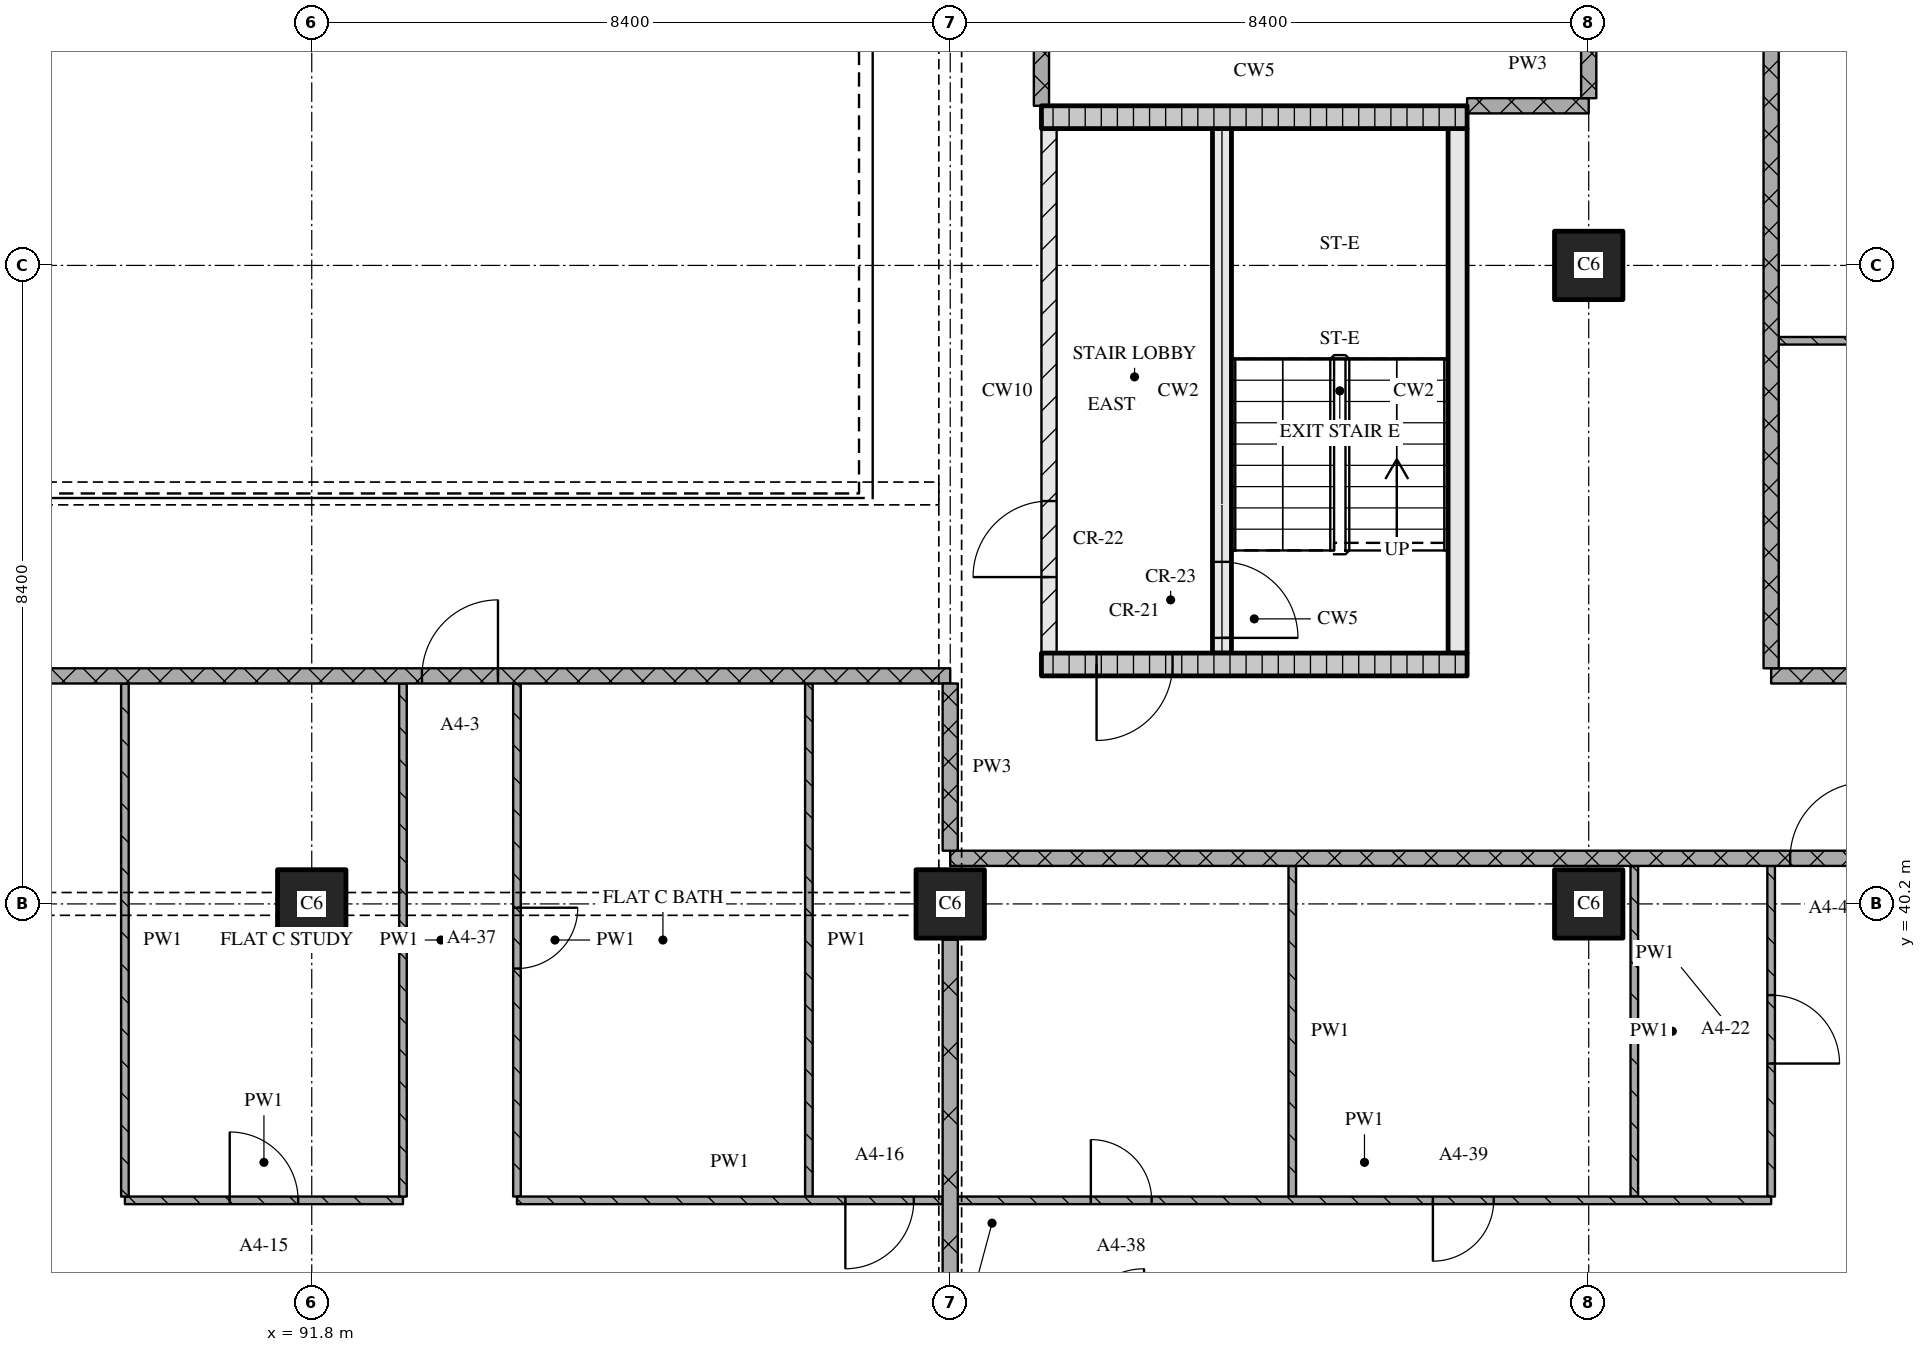
"""IFC4 building model, lengths in metres.
Left out: names, types, materials, properties, quantities, classifications, styles, units other than length and angle.
Written with IfcOpenShell. Run it as: python <this file> out.ifc"""

import sys

from ifc_helpers import new_model, si_unit, direction, frame, frame_2d, origin, origin_2d, place, context, subcontext, project, spatial, rectangle, extrude, element, fill, save


model = new_model("IFC4")
c1 = context("Model", 3, precision=1e-05, world=origin(), true_north=direction((0.0, 1.0)))
c2 = subcontext(c1, "Body", "Model", "MODEL_VIEW")
j1 = project(units=[si_unit("LENGTHUNIT", "METRE"), si_unit("PLANEANGLEUNIT", "RADIAN")], contexts=[c1])
p1 = place(None, origin())
s1 = spatial("IfcSite", under=j1, at=p1, CompositionType="ELEMENT")
p2 = place(p1, origin())
s2 = spatial("IfcBuilding", under=s1, at=p2, CompositionType="ELEMENT")
p3 = place(p2, frame((0.0, 0.0, 69.6)))
s3 = spatial("IfcBuildingStorey", under=s2, at=p3, CompositionType="ELEMENT", Elevation=69.6)
for number, where, z_axis, x_axis in (
    (1, (91.8, 40.2, 0.0), (0.0, 0.0, 1.0), (1.0, 0.0, 0.0)),
    (2, (100.2, 40.2, 0.0), (0.0, 0.0, 1.0), (1.0, 0.0, 0.0)),
    (3, (108.6, 40.2, 0.0), (0.0, 0.0, 1.0), (1.0, 0.0, 0.0)),
    (4, (108.6, 48.6, 0.0), (0.0, 0.0, 1.0), (1.0, 0.0, 0.0)),
):
    element("IfcColumn", number, at=place(p3, frame(where, z_axis=z_axis, x_axis=x_axis)), inside=s3, PredefinedType="COLUMN", context=c2, shape_type="SweptSolid", body=[
        extrude(rectangle(XDim=0.9, YDim=0.9, at=origin_2d()), origin(), (0.0, 0.0, 1.0), 3.6),
    ])
p4 = place(p3, frame((101.4, 43.35, 0.0), z_axis=(0.0, 0.0, 1.0), x_axis=(1.0, 0.0, 0.0)))
e5 = element("IfcWall", 5, at=p4, inside=s3, PredefinedType="SOLIDWALL", context=c2, shape_type="SweptSolid", body=[
    extrude(rectangle(XDim=5.6, YDim=0.3, at=frame_2d((2.8, 0.0))), origin(), (0.0, 0.0, 1.0), 3.32),
])
p5 = place(p4, frame((0.725, 0.0, 0.0)))
e6 = element("IfcOpeningElement", 6, at=p5, cuts=e5, PredefinedType="OPENING", context=c2, shape_type="SweptSolid", body=[
    extrude(rectangle(XDim=1.0, YDim=2.1, at=frame_2d((0.5, 1.05))), frame((0.0, 0.16, 0.0), z_axis=(0.0, -1.0, 0.0), x_axis=(1.0, 0.0, 0.0)), (0.0, 0.0, 1.0), 0.32),
])
p6 = place(p3, frame((101.5, 43.5, 0.0), z_axis=(0.0, 0.0, 1.0), x_axis=(0.0, 1.0, 0.0)))
e7 = element("IfcWall", 7, at=p6, inside=s3, PredefinedType="PARTITIONING", context=c2, shape_type="SweptSolid", body=[
    extrude(rectangle(XDim=6.9, YDim=0.2, at=frame_2d((3.45, 0.0))), origin(), (0.0, 0.0, 1.0), 3.32),
])
p7 = place(p6, frame((1.0, 0.0, 0.0)))
e8 = element("IfcOpeningElement", 8, at=p7, cuts=e7, PredefinedType="OPENING", context=c2, shape_type="SweptSolid", body=[
    extrude(rectangle(XDim=1.0, YDim=2.1, at=frame_2d((0.5, 1.05))), frame((0.0, 0.11, 0.0), z_axis=(0.0, -1.0, 0.0), x_axis=(1.0, 0.0, 0.0)), (0.0, 0.0, 1.0), 0.22),
])
p8 = place(p3, frame((103.775, 43.5, 0.0), z_axis=(0.0, 0.0, 1.0), x_axis=(0.0, 1.0, 0.0)))
e9 = element("IfcWall", 9, at=p8, inside=s3, PredefinedType="SOLIDWALL", context=c2, shape_type="SweptSolid", body=[
    extrude(rectangle(XDim=6.9, YDim=0.25, at=frame_2d((3.45, 0.0))), origin(), (0.0, 0.0, 1.0), 3.32),
])
p9 = place(p8, frame((0.2, 0.0, 0.0)))
e10 = element("IfcOpeningElement", 10, at=p9, cuts=e9, PredefinedType="OPENING", context=c2, shape_type="SweptSolid", body=[
    extrude(rectangle(XDim=1.0, YDim=2.1, at=frame_2d((0.5, 1.05))), frame((0.0, 0.135, 0.0), z_axis=(0.0, -1.0, 0.0), x_axis=(1.0, 0.0, 0.0)), (0.0, 0.0, 1.0), 0.27),
])
p10 = place(p3, frame((106.875, 43.5, 0.0), z_axis=(0.0, 0.0, 1.0), x_axis=(0.0, 1.0, 0.0)))
e11 = element("IfcWall", 11, at=p10, inside=s3, PredefinedType="SOLIDWALL", context=c2, shape_type="SweptSolid", body=[
    extrude(rectangle(XDim=6.9, YDim=0.25, at=frame_2d((3.45, 0.0))), origin(), (0.0, 0.0, 1.0), 3.32),
])
p11 = place(p3, frame((101.4, 50.55, 0.0), z_axis=(0.0, 0.0, 1.0), x_axis=(1.0, 0.0, 0.0)))
e12 = element("IfcWall", 12, at=p11, inside=s3, PredefinedType="SOLIDWALL", context=c2, shape_type="SweptSolid", body=[
    extrude(rectangle(XDim=5.6, YDim=0.3, at=frame_2d((2.8, 0.0))), origin(), (0.0, 0.0, 1.0), 3.32),
])
p12 = place(p3, frame((89.342, 36.3, 0.0), z_axis=(0.0, 0.0, 1.0), x_axis=(1.0, 0.0, 0.0)))
e13 = element("IfcWall", 13, at=p12, inside=s3, PredefinedType="PARTITIONING", context=c2, shape_type="SweptSolid", body=[
    extrude(rectangle(XDim=3.658, YDim=0.1, at=frame_2d((1.829, 0.0))), origin(), (0.0, 0.0, 1.0), 3.32),
])
p13 = place(p12, frame((1.379, 0.0, 0.0)))
e14 = element("IfcOpeningElement", 14, at=p13, cuts=e13, PredefinedType="OPENING", context=c2, shape_type="SweptSolid", body=[
    extrude(rectangle(XDim=0.9, YDim=2.1, at=frame_2d((0.45, 1.05))), frame((0.0, 0.06, 0.0), z_axis=(0.0, -1.0, 0.0), x_axis=(1.0, 0.0, 0.0)), (0.0, 0.0, 1.0), 0.12),
])
p14 = place(p3, frame((124.28, 40.8, 0.0), z_axis=(0.0, 0.0, 1.0), x_axis=(-1.0, 0.0, 0.0)))
e15 = element("IfcWall", 15, at=p14, inside=s3, PredefinedType="PARTITIONING", context=c2, shape_type="SweptSolid", body=[
    extrude(rectangle(XDim=24.08, YDim=0.2, at=frame_2d((12.04, 0.0))), origin(), (0.0, 0.0, 1.0), 3.32),
])
p15 = place(p14, frame((12.03, 0.0, 0.0)))
e16 = element("IfcOpeningElement", 16, at=p15, cuts=e15, PredefinedType="OPENING", context=c2, shape_type="SweptSolid", body=[
    extrude(rectangle(XDim=1.0, YDim=2.1, at=frame_2d((0.5, 1.05))), frame((0.0, 0.11, 0.0), z_axis=(0.0, -1.0, 0.0), x_axis=(1.0, 0.0, 0.0)), (0.0, 0.0, 1.0), 0.22),
])
p16 = place(p3, frame((100.2, 43.2, 0.0), z_axis=(0.0, 0.0, 1.0), x_axis=(-1.0, 0.0, 0.0)))
e17 = element("IfcWall", 17, at=p16, inside=s3, PredefinedType="PARTITIONING", context=c2, shape_type="SweptSolid", body=[
    extrude(rectangle(XDim=25.2, YDim=0.2, at=frame_2d((12.6, 0.0))), origin(), (0.0, 0.0, 1.0), 3.32),
])
p17 = place(p16, frame((5.95, 0.0, 0.0)))
e18 = element("IfcOpeningElement", 18, at=p17, cuts=e17, PredefinedType="OPENING", context=c2, shape_type="SweptSolid", body=[
    extrude(rectangle(XDim=1.0, YDim=2.1, at=frame_2d((0.5, 1.05))), frame((0.0, 0.11, 0.0), z_axis=(0.0, -1.0, 0.0), x_axis=(1.0, 0.0, 0.0)), (0.0, 0.0, 1.0), 0.22),
])
p18 = place(p16, frame((21.25, 0.0, 0.0)))
e19 = element("IfcOpeningElement", 19, at=p18, cuts=e17, PredefinedType="OPENING", context=c2, shape_type="SweptSolid", body=[
    extrude(rectangle(XDim=1.0, YDim=2.1, at=frame_2d((0.5, 1.05))), frame((0.0, 0.11, 0.0), z_axis=(0.0, -1.0, 0.0), x_axis=(1.0, 0.0, 0.0)), (0.0, 0.0, 1.0), 0.22),
])
p19 = place(p3, frame((111.0, 43.2, 0.0), z_axis=(0.0, 0.0, 1.0), x_axis=(1.0, 0.0, 0.0)))
e20 = element("IfcWall", 20, at=p19, inside=s3, PredefinedType="PARTITIONING", context=c2, shape_type="SweptSolid", body=[
    extrude(rectangle(XDim=15.92, YDim=0.2, at=frame_2d((7.96, 0.0))), origin(), (0.0, 0.0, 1.0), 3.32),
])
p20 = place(p3, frame((111.1, 47.609, 0.0), z_axis=(0.0, 0.0, 1.0), x_axis=(1.0, 0.0, 0.0)))
e21 = element("IfcWall", 21, at=p20, inside=s3, PredefinedType="PARTITIONING", context=c2, shape_type="SweptSolid", body=[
    extrude(rectangle(XDim=9.2, YDim=0.1, at=frame_2d((4.6, 0.0))), origin(), (0.0, 0.0, 1.0), 3.32),
])
p21 = place(p3, frame((107.0, 50.7, 0.0), z_axis=(0.0, 0.0, 1.0), x_axis=(1.0, 0.0, 0.0)))
e22 = element("IfcWall", 22, at=p21, inside=s3, PredefinedType="PARTITIONING", context=c2, shape_type="SweptSolid", body=[
    extrude(rectangle(XDim=1.6, YDim=0.2, at=frame_2d((0.8, 0.0))), origin(), (0.0, 0.0, 1.0), 3.32),
])
for number, where, z_axis, x_axis in (
    (23, (89.342, 43.1, 0.0), (0.0, 0.0, 1.0), (0.0, -1.0, 0.0)),
    (24, (93.0, 43.1, 0.0), (0.0, 0.0, 1.0), (0.0, -1.0, 0.0)),
):
    element("IfcWall", number, at=place(p3, frame(where, z_axis=z_axis, x_axis=x_axis)), inside=s3, PredefinedType="PARTITIONING", context=c2, shape_type="SweptSolid", body=[
        extrude(rectangle(XDim=6.75, YDim=0.1, at=frame_2d((3.375, 0.0))), origin(), (0.0, 0.0, 1.0), 3.32),
    ])
p22 = place(p3, frame((94.5, 43.1, 0.0), z_axis=(0.0, 0.0, 1.0), x_axis=(0.0, -1.0, 0.0)))
e25 = element("IfcWall", 25, at=p22, inside=s3, PredefinedType="PARTITIONING", context=c2, shape_type="SweptSolid", body=[
    extrude(rectangle(XDim=6.75, YDim=0.1, at=frame_2d((3.375, 0.0))), origin(), (0.0, 0.0, 1.0), 3.32),
])
p23 = place(p22, frame((2.95, 0.0, 0.0)))
e26 = element("IfcOpeningElement", 26, at=p23, cuts=e25, PredefinedType="OPENING", context=c2, shape_type="SweptSolid", body=[
    extrude(rectangle(XDim=0.8, YDim=2.1, at=frame_2d((0.4, 1.05))), frame((0.0, 0.06, 0.0), z_axis=(0.0, -1.0, 0.0), x_axis=(1.0, 0.0, 0.0)), (0.0, 0.0, 1.0), 0.12),
])
p24 = place(p3, frame((98.341, 43.1, 0.0), z_axis=(0.0, 0.0, 1.0), x_axis=(0.0, -1.0, 0.0)))
e27 = element("IfcWall", 27, at=p24, inside=s3, PredefinedType="PARTITIONING", context=c2, shape_type="SweptSolid", body=[
    extrude(rectangle(XDim=6.75, YDim=0.1, at=frame_2d((3.375, 0.0))), origin(), (0.0, 0.0, 1.0), 3.32),
])
p25 = place(p3, frame((100.2, 43.1, 0.0), z_axis=(0.0, 0.0, 1.0), x_axis=(0.0, -1.0, 0.0)))
e28 = element("IfcWall", 28, at=p25, inside=s3, PredefinedType="PARTITIONING", context=c2, shape_type="SweptSolid", body=[
    extrude(rectangle(XDim=2.2, YDim=0.2, at=frame_2d((1.1, 0.0))), origin(), (0.0, 0.0, 1.0), 2.43),
])
p26 = place(p3, frame((100.2, 39.73, 0.0), z_axis=(0.0, 0.0, 1.0), x_axis=(0.0, -1.0, 0.0)))
e29 = element("IfcWall", 29, at=p26, inside=s3, PredefinedType="PARTITIONING", context=c2, shape_type="SweptSolid", body=[
    extrude(rectangle(XDim=7.46, YDim=0.2, at=frame_2d((3.73, 0.0))), origin(), (0.0, 0.0, 1.0), 2.83),
])
p27 = place(p3, frame((101.4, 58.7, 0.0), z_axis=(0.0, 0.0, 1.0), x_axis=(0.0, -1.0, 0.0)))
e30 = element("IfcWall", 30, at=p27, inside=s3, PredefinedType="PARTITIONING", context=c2, shape_type="SweptSolid", body=[
    extrude(rectangle(XDim=8.0, YDim=0.2, at=frame_2d((4.0, 0.0))), origin(), (0.0, 0.0, 1.0), 3.32),
])
p28 = place(p3, frame((104.7, 40.7, 0.0), z_axis=(0.0, 0.0, 1.0), x_axis=(0.0, -1.0, 0.0)))
e31 = element("IfcWall", 31, at=p28, inside=s3, PredefinedType="PARTITIONING", context=c2, shape_type="SweptSolid", body=[
    extrude(rectangle(XDim=4.35, YDim=0.1, at=frame_2d((2.175, 0.0))), origin(), (0.0, 0.0, 1.0), 3.32),
])
p29 = place(p3, frame((108.6, 50.8, 0.0), z_axis=(0.0, 0.0, 1.0), x_axis=(0.0, 1.0, 0.0)))
e32 = element("IfcWall", 32, at=p29, inside=s3, PredefinedType="PARTITIONING", context=c2, shape_type="SweptSolid", body=[
    extrude(rectangle(XDim=5.73, YDim=0.2, at=frame_2d((2.865, 0.0))), origin(), (0.0, 0.0, 1.0), 3.32),
])
p30 = place(p29, frame((2.05, 0.0, 0.0)))
e33 = element("IfcOpeningElement", 33, at=p30, cuts=e32, PredefinedType="OPENING", context=c2, shape_type="SweptSolid", body=[
    extrude(rectangle(XDim=1.2, YDim=2.1, at=frame_2d((0.6, 1.05))), frame((0.0, 0.11, 0.0), z_axis=(0.0, -1.0, 0.0), x_axis=(1.0, 0.0, 0.0)), (0.0, 0.0, 1.0), 0.22),
])
p31 = place(p3, frame((109.2, 40.7, 0.0), z_axis=(0.0, 0.0, 1.0), x_axis=(0.0, -1.0, 0.0)))
e34 = element("IfcWall", 34, at=p31, inside=s3, PredefinedType="PARTITIONING", context=c2, shape_type="SweptSolid", body=[
    extrude(rectangle(XDim=4.35, YDim=0.1, at=frame_2d((2.175, 0.0))), origin(), (0.0, 0.0, 1.0), 3.32),
])
p32 = place(p3, frame((111.0, 75.32, 0.0), z_axis=(0.0, 0.0, 1.0), x_axis=(0.0, -1.0, 0.0)))
e35 = element("IfcWall", 35, at=p32, inside=s3, PredefinedType="PARTITIONING", context=c2, shape_type="SweptSolid", body=[
    extrude(rectangle(XDim=32.02, YDim=0.2, at=frame_2d((16.01, 0.0))), origin(), (0.0, 0.0, 1.0), 3.32),
])
p33 = place(p32, frame((5.37, 0.0, 0.0)))
e36 = element("IfcOpeningElement", 36, at=p33, cuts=e35, PredefinedType="OPENING", context=c2, shape_type="SweptSolid", body=[
    extrude(rectangle(XDim=1.0, YDim=2.1, at=frame_2d((0.5, 1.05))), frame((0.0, 0.11, 0.0), z_axis=(0.0, -1.0, 0.0), x_axis=(1.0, 0.0, 0.0)), (0.0, 0.0, 1.0), 0.22),
])
p34 = place(p32, frame((19.47, 0.0, 0.0)))
e37 = element("IfcOpeningElement", 37, at=p34, cuts=e35, PredefinedType="OPENING", context=c2, shape_type="SweptSolid", body=[
    extrude(rectangle(XDim=1.0, YDim=2.1, at=frame_2d((0.5, 1.05))), frame((0.0, 0.11, 0.0), z_axis=(0.0, -1.0, 0.0), x_axis=(1.0, 0.0, 0.0)), (0.0, 0.0, 1.0), 0.22),
])
p35 = place(p3, frame((111.0, 36.35, 0.0), z_axis=(0.0, 0.0, 1.0), x_axis=(0.0, 1.0, 0.0)))
e38 = element("IfcWall", 38, at=p35, inside=s3, PredefinedType="PARTITIONING", context=c2, shape_type="SweptSolid", body=[
    extrude(rectangle(XDim=4.35, YDim=0.1, at=frame_2d((2.175, 0.0))), origin(), (0.0, 0.0, 1.0), 3.32),
])
p36 = place(p35, frame((1.75, 0.0, 0.0)))
e39 = element("IfcOpeningElement", 39, at=p36, cuts=e38, PredefinedType="OPENING", context=c2, shape_type="SweptSolid", body=[
    extrude(rectangle(XDim=0.9, YDim=2.1, at=frame_2d((0.45, 1.05))), frame((0.0, 0.06, 0.0), z_axis=(0.0, -1.0, 0.0), x_axis=(1.0, 0.0, 0.0)), (0.0, 0.0, 1.0), 0.12),
])
p37 = place(p3, frame((94.5, 36.3, 0.0), z_axis=(0.0, 0.0, 1.0), x_axis=(1.0, 0.0, 0.0)))
e40 = element("IfcWall", 40, at=p37, inside=s3, PredefinedType="PARTITIONING", context=c2, shape_type="SweptSolid", body=[
    extrude(rectangle(XDim=5.6, YDim=0.1, at=frame_2d((2.8, 0.0))), origin(), (0.0, 0.0, 1.0), 3.32),
])
p38 = place(p37, frame((4.32, 0.0, 0.0)))
e41 = element("IfcOpeningElement", 41, at=p38, cuts=e40, PredefinedType="OPENING", context=c2, shape_type="SweptSolid", body=[
    extrude(rectangle(XDim=0.9, YDim=2.1, at=frame_2d((0.45, 1.05))), frame((0.0, 0.06, 0.0), z_axis=(0.0, -1.0, 0.0), x_axis=(1.0, 0.0, 0.0)), (0.0, 0.0, 1.0), 0.12),
])
p39 = place(p3, frame((100.3, 36.3, 0.0), z_axis=(0.0, 0.0, 1.0), x_axis=(1.0, 0.0, 0.0)))
e42 = element("IfcWall", 42, at=p39, inside=s3, PredefinedType="PARTITIONING", context=c2, shape_type="SweptSolid", body=[
    extrude(rectangle(XDim=10.7, YDim=0.1, at=frame_2d((5.35, 0.0))), origin(), (0.0, 0.0, 1.0), 3.32),
])
p40 = place(p39, frame((1.75, 0.0, 0.0)))
e43 = element("IfcOpeningElement", 43, at=p40, cuts=e42, PredefinedType="OPENING", context=c2, shape_type="SweptSolid", body=[
    extrude(rectangle(XDim=0.8, YDim=2.1, at=frame_2d((0.4, 1.05))), frame((0.0, 0.06, 0.0), z_axis=(0.0, -1.0, 0.0), x_axis=(1.0, 0.0, 0.0)), (0.0, 0.0, 1.0), 0.12),
])
p41 = place(p39, frame((6.25, 0.0, 0.0)))
e44 = element("IfcOpeningElement", 44, at=p41, cuts=e42, PredefinedType="OPENING", context=c2, shape_type="SweptSolid", body=[
    extrude(rectangle(XDim=0.8, YDim=2.1, at=frame_2d((0.4, 1.05))), frame((0.0, 0.06, 0.0), z_axis=(0.0, -1.0, 0.0), x_axis=(1.0, 0.0, 0.0)), (0.0, 0.0, 1.0), 0.12),
])
p42 = place(p5, origin())
e45 = element("IfcDoor", 45, at=p42, inside=s3, OperationType="SINGLE_SWING_RIGHT", PredefinedType="DOOR", context=c2, shape_type="SweptSolid", body=[
    extrude(rectangle(XDim=1.0, YDim=2.1, at=frame_2d((0.5, 1.05))), frame((0.0, 0.025, 0.0), z_axis=(0.0, -1.0, 0.0), x_axis=(1.0, 0.0, 0.0)), (0.0, 0.0, 1.0), 0.05),
])
fill(e6, e45)
p43 = place(p9, origin())
e46 = element("IfcDoor", 46, at=p43, inside=s3, OperationType="SINGLE_SWING_RIGHT", PredefinedType="DOOR", context=c2, shape_type="SweptSolid", body=[
    extrude(rectangle(XDim=1.0, YDim=2.1, at=frame_2d((0.5, 1.05))), frame((0.0, 0.025, 0.0), z_axis=(0.0, -1.0, 0.0), x_axis=(1.0, 0.0, 0.0)), (0.0, 0.0, 1.0), 0.05),
])
fill(e10, e46)
p44 = place(p7, origin())
e47 = element("IfcDoor", 47, at=p44, inside=s3, OperationType="SINGLE_SWING_LEFT", PredefinedType="DOOR", context=c2, shape_type="SweptSolid", body=[
    extrude(rectangle(XDim=1.0, YDim=2.1, at=frame_2d((0.5, 1.05))), frame((0.0, 0.025, 0.0), z_axis=(0.0, -1.0, 0.0), x_axis=(1.0, 0.0, 0.0)), (0.0, 0.0, 1.0), 0.05),
])
fill(e8, e47)
p45 = place(p13, origin())
e48 = element("IfcDoor", 48, at=p45, inside=s3, OperationType="SINGLE_SWING_LEFT", PredefinedType="DOOR", context=c2, shape_type="SweptSolid", body=[
    extrude(rectangle(XDim=0.9, YDim=2.1, at=frame_2d((0.45, 1.05))), frame((0.0, 0.025, 0.0), z_axis=(0.0, -1.0, 0.0), x_axis=(1.0, 0.0, 0.0)), (0.0, 0.0, 1.0), 0.05),
])
fill(e14, e48)
p46 = place(p15, origin())
e49 = element("IfcDoor", 49, at=p46, inside=s3, OperationType="SINGLE_SWING_RIGHT", PredefinedType="DOOR", context=c2, shape_type="SweptSolid", body=[
    extrude(rectangle(XDim=1.0, YDim=2.1, at=frame_2d((0.5, 1.05))), frame((0.0, 0.025, 0.0), z_axis=(0.0, -1.0, 0.0), x_axis=(1.0, 0.0, 0.0)), (0.0, 0.0, 1.0), 0.05),
])
fill(e16, e49)
p47 = place(p17, origin())
e50 = element("IfcDoor", 50, at=p47, inside=s3, OperationType="SINGLE_SWING_RIGHT", PredefinedType="DOOR", context=c2, shape_type="SweptSolid", body=[
    extrude(rectangle(XDim=1.0, YDim=2.1, at=frame_2d((0.5, 1.05))), frame((0.0, 0.025, 0.0), z_axis=(0.0, -1.0, 0.0), x_axis=(1.0, 0.0, 0.0)), (0.0, 0.0, 1.0), 0.05),
])
fill(e18, e50)
p48 = place(p23, origin())
e51 = element("IfcDoor", 51, at=p48, inside=s3, OperationType="SINGLE_SWING_LEFT", PredefinedType="DOOR", context=c2, shape_type="SweptSolid", body=[
    extrude(rectangle(XDim=0.8, YDim=2.1, at=frame_2d((0.4, 1.05))), frame((0.0, 0.025, 0.0), z_axis=(0.0, -1.0, 0.0), x_axis=(1.0, 0.0, 0.0)), (0.0, 0.0, 1.0), 0.05),
])
fill(e26, e51)
p49 = place(p36, origin())
e52 = element("IfcDoor", 52, at=p49, inside=s3, OperationType="SINGLE_SWING_RIGHT", PredefinedType="DOOR", context=c2, shape_type="SweptSolid", body=[
    extrude(rectangle(XDim=0.9, YDim=2.1, at=frame_2d((0.45, 1.05))), frame((0.0, 0.025, 0.0), z_axis=(0.0, -1.0, 0.0), x_axis=(1.0, 0.0, 0.0)), (0.0, 0.0, 1.0), 0.05),
])
fill(e39, e52)
p50 = place(p38, origin())
e53 = element("IfcDoor", 53, at=p50, inside=s3, OperationType="SINGLE_SWING_RIGHT", PredefinedType="DOOR", context=c2, shape_type="SweptSolid", body=[
    extrude(rectangle(XDim=0.9, YDim=2.1, at=frame_2d((0.45, 1.05))), frame((0.0, 0.025, 0.0), z_axis=(0.0, -1.0, 0.0), x_axis=(1.0, 0.0, 0.0)), (0.0, 0.0, 1.0), 0.05),
])
fill(e41, e53)
p51 = place(p40, origin())
e54 = element("IfcDoor", 54, at=p51, inside=s3, OperationType="SINGLE_SWING_LEFT", PredefinedType="DOOR", context=c2, shape_type="SweptSolid", body=[
    extrude(rectangle(XDim=0.8, YDim=2.1, at=frame_2d((0.4, 1.05))), frame((0.0, 0.025, 0.0), z_axis=(0.0, -1.0, 0.0), x_axis=(1.0, 0.0, 0.0)), (0.0, 0.0, 1.0), 0.05),
])
fill(e43, e54)
p52 = place(p41, origin())
e55 = element("IfcDoor", 55, at=p52, inside=s3, OperationType="SINGLE_SWING_RIGHT", PredefinedType="DOOR", context=c2, shape_type="SweptSolid", body=[
    extrude(rectangle(XDim=0.8, YDim=2.1, at=frame_2d((0.4, 1.05))), frame((0.0, 0.025, 0.0), z_axis=(0.0, -1.0, 0.0), x_axis=(1.0, 0.0, 0.0)), (0.0, 0.0, 1.0), 0.05),
])
fill(e44, e55)
save(model, sys.argv[1])
